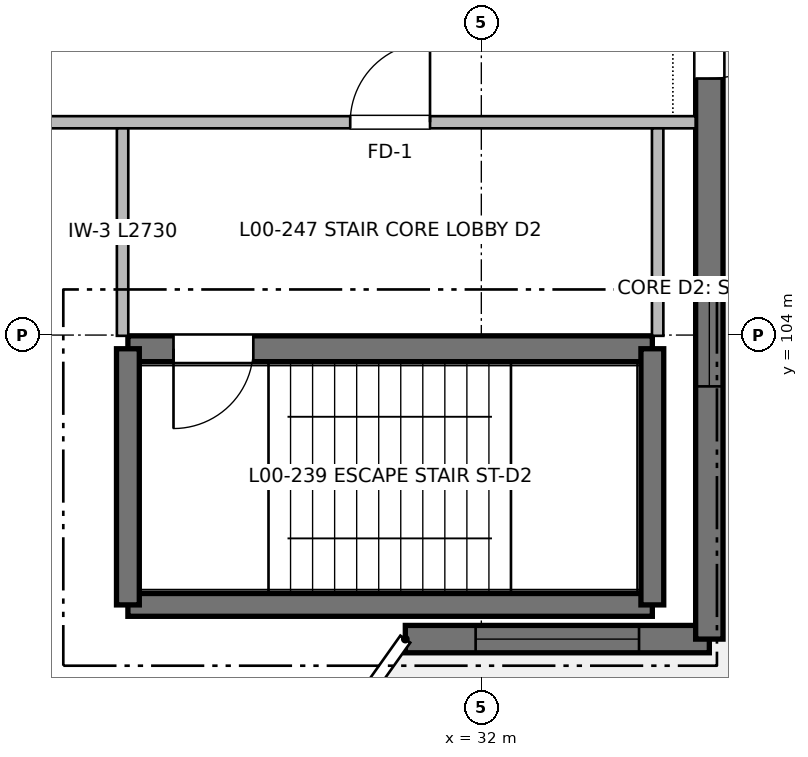
"""IFC4 building model, lengths in metres.
Left out: names, types, materials, properties, quantities, classifications, styles, units other than length and angle.
Written with IfcOpenShell. Run it as: python <this file> out.ifc"""

import sys

from ifc_helpers import new_model, si_unit, direction, frame, frame_2d, origin, place, context, subcontext, project, spatial, rectangle, extrude, element, fill, save


model = new_model("IFC4")
c1 = context("Model", 3, precision=1e-05, world=origin(), true_north=direction((0.0, 1.0)))
c2 = subcontext(c1, "Body", "Model", "MODEL_VIEW")
j1 = project(units=[si_unit("LENGTHUNIT", "METRE"), si_unit("PLANEANGLEUNIT", "RADIAN")], contexts=[c1])
p1 = place(None, origin())
s1 = spatial("IfcSite", under=j1, at=p1, CompositionType="ELEMENT")
p2 = place(p1, origin())
s2 = spatial("IfcBuilding", under=s1, at=p2, CompositionType="ELEMENT")
p3 = place(p2, origin())
s3 = spatial("IfcBuildingStorey", under=s2, at=p3, CompositionType="ELEMENT", Elevation=0.0)
p4 = place(p3, frame((27.35, 100.45, 0.0), z_axis=(0.0, 0.0, 1.0), x_axis=(1.0, 0.0, 0.0)))
e1 = element("IfcWall", 1, at=p4, inside=s3, PredefinedType="SHEAR", context=c2, shape_type="SweptSolid", body=[
    extrude(rectangle(XDim=6.9, YDim=0.3, at=frame_2d((3.45, 0.0))), origin(), (0.0, 0.0, 1.0), 4.16),
])
p5 = place(p3, frame((34.25, 103.82, 0.0), z_axis=(0.0, 0.0, 1.0), x_axis=(-1.0, 0.0, 0.0)))
e2 = element("IfcWall", 2, at=p5, inside=s3, PredefinedType="SHEAR", context=c2, shape_type="SweptSolid", body=[
    extrude(rectangle(XDim=6.9, YDim=0.34, at=frame_2d((3.45, 0.0))), origin(), (0.0, 0.0, 1.0), 4.16),
])
p6 = place(p5, frame((5.25, 0.0, 0.0)))
e3 = element("IfcOpeningElement", 3, at=p6, cuts=e2, PredefinedType="OPENING", context=c2, shape_type="SweptSolid", body=[
    extrude(rectangle(XDim=1.05, YDim=2.15, at=frame_2d((0.525, 1.075))), frame((0.0, 0.18, 0.0), z_axis=(0.0, -1.0, 0.0), x_axis=(1.0, 0.0, 0.0)), (0.0, 0.0, 1.0), 0.36),
])
for number, where, z_axis, x_axis in (
    (4, (27.35, 103.82, 0.0), (0.0, 0.0, 1.0), (0.0, -1.0, 0.0)),
    (5, (34.25, 100.45, 0.0), (0.0, 0.0, 1.0), (0.0, 1.0, 0.0)),
):
    element("IfcWall", number, at=place(p3, frame(where, z_axis=z_axis, x_axis=x_axis)), inside=s3, PredefinedType="SHEAR", context=c2, shape_type="SweptSolid", body=[
        extrude(rectangle(XDim=3.37, YDim=0.3, at=frame_2d((1.685, 0.0))), origin(), (0.0, 0.0, 1.0), 4.16),
    ])
p7 = place(p3, frame((35.0, 100.0, 0.0), z_axis=(0.0, 0.0, 1.0), x_axis=(-1.0, 0.0, 0.0)))
e6 = element("IfcWall", 6, at=p7, inside=s3, PredefinedType="SHEAR", context=c2, shape_type="SweptSolid", body=[
    extrude(rectangle(XDim=4.0, YDim=0.36, at=frame_2d((2.0, 0.0))), origin(), (0.0, 0.0, 1.0), 3.94),
])
p8 = place(p7, frame((0.925, 0.0, 0.95)))
e7 = element("IfcOpeningElement", 7, at=p8, cuts=e6, PredefinedType="OPENING", context=c2, shape_type="SweptSolid", body=[
    extrude(rectangle(XDim=2.15, YDim=1.8, at=frame_2d((1.075, 0.9))), frame((0.0, 0.19, 0.0), z_axis=(0.0, -1.0, 0.0), x_axis=(1.0, 0.0, 0.0)), (0.0, 0.0, 1.0), 0.38),
])
p9 = place(p3, frame((35.0, 116.0, 0.0), z_axis=(0.0, 0.0, 1.0), x_axis=(0.0, -1.0, 0.0)))
e8 = element("IfcWall", 8, at=p9, inside=s3, PredefinedType="SHEAR", context=c2, shape_type="SweptSolid", body=[
    extrude(rectangle(XDim=16.0, YDim=0.36, at=frame_2d((8.0, 0.0))), origin(), (0.0, 0.0, 1.0), 3.94),
])
p10 = place(p9, frame((7.375, 0.0, 0.0)))
e9 = element("IfcOpeningElement", 9, at=p10, cuts=e8, PredefinedType="OPENING", context=c2, shape_type="SweptSolid", body=[
    extrude(rectangle(XDim=1.25, YDim=2.2, at=frame_2d((0.625, 1.1))), frame((0.0, 0.19, 0.0), z_axis=(0.0, -1.0, 0.0), x_axis=(1.0, 0.0, 0.0)), (0.0, 0.0, 1.0), 0.38),
])
p11 = place(p9, frame((11.325, 0.0, 0.95)))
e10 = element("IfcOpeningElement", 10, at=p11, cuts=e8, PredefinedType="OPENING", context=c2, shape_type="SweptSolid", body=[
    extrude(rectangle(XDim=1.35, YDim=1.3, at=frame_2d((0.675, 0.65))), frame((0.0, 0.19, 0.0), z_axis=(0.0, -1.0, 0.0), x_axis=(1.0, 0.0, 0.0)), (0.0, 0.0, 1.0), 0.38),
])
p12 = place(p3, frame((17.2, 106.8, 0.0), z_axis=(0.0, 0.0, 1.0), x_axis=(1.0, 0.0, 0.0)))
e11 = element("IfcWall", 11, at=p12, inside=s3, PredefinedType="PARTITIONING", context=c2, shape_type="SweptSolid", body=[
    extrude(rectangle(XDim=17.62, YDim=0.16, at=frame_2d((8.81, 0.0))), origin(), (0.0, 0.0, 1.0), 3.895),
])
p13 = place(p12, frame((13.075, 0.0, 0.0)))
e12 = element("IfcOpeningElement", 12, at=p13, cuts=e11, PredefinedType="OPENING", context=c2, shape_type="SweptSolid", body=[
    extrude(rectangle(XDim=1.05, YDim=2.15, at=frame_2d((0.525, 1.075))), frame((0.0, 0.09, 0.0), z_axis=(0.0, -1.0, 0.0), x_axis=(1.0, 0.0, 0.0)), (0.0, 0.0, 1.0), 0.18),
])
for number, where, z_axis, x_axis in (
    (13, (27.28, 103.99, 0.0), (0.0, 0.0, 1.0), (0.0, 1.0, 0.0)),
    (14, (34.32, 103.99, 0.0), (0.0, 0.0, 1.0), (0.0, 1.0, 0.0)),
):
    element("IfcWall", number, at=place(p3, frame(where, z_axis=z_axis, x_axis=x_axis)), inside=s3, PredefinedType="PARTITIONING", context=c2, shape_type="SweptSolid", body=[
        extrude(rectangle(XDim=2.73, YDim=0.15, at=frame_2d((1.365, 0.0))), origin(), (0.0, 0.0, 1.0), 3.895),
    ])
p14 = place(p6, origin())
e15 = element("IfcDoor", 15, at=p14, inside=s3, OperationType="SINGLE_SWING_RIGHT", PredefinedType="DOOR", context=c2, shape_type="SweptSolid", body=[
    extrude(rectangle(XDim=1.05, YDim=2.15, at=frame_2d((0.525, 1.075))), frame((0.0, 0.025, 0.0), z_axis=(0.0, -1.0, 0.0), x_axis=(1.0, 0.0, 0.0)), (0.0, 0.0, 1.0), 0.05),
])
fill(e3, e15)
p15 = place(p8, origin())
e16 = element("IfcWindow", 16, at=p15, inside=s3, PartitioningType="SINGLE_PANEL", PredefinedType="WINDOW", context=c2, shape_type="SweptSolid", body=[
    extrude(rectangle(XDim=2.15, YDim=1.8, at=frame_2d((1.075, 0.9))), frame((0.0, 0.03, 0.0), z_axis=(0.0, -1.0, 0.0), x_axis=(1.0, 0.0, 0.0)), (0.0, 0.0, 1.0), 0.06),
])
fill(e7, e16)
p16 = place(p10, origin())
e17 = element("IfcDoor", 17, at=p16, inside=s3, OperationType="SINGLE_SWING_LEFT", PredefinedType="DOOR", context=c2, shape_type="SweptSolid", body=[
    extrude(rectangle(XDim=1.25, YDim=2.2, at=frame_2d((0.625, 1.1))), frame((0.0, 0.025, 0.0), z_axis=(0.0, -1.0, 0.0), x_axis=(1.0, 0.0, 0.0)), (0.0, 0.0, 1.0), 0.05),
])
fill(e9, e17)
p17 = place(p11, origin())
e18 = element("IfcWindow", 18, at=p17, inside=s3, PartitioningType="SINGLE_PANEL", PredefinedType="WINDOW", context=c2, shape_type="SweptSolid", body=[
    extrude(rectangle(XDim=1.35, YDim=1.3, at=frame_2d((0.675, 0.65))), frame((0.0, 0.03, 0.0), z_axis=(0.0, -1.0, 0.0), x_axis=(1.0, 0.0, 0.0)), (0.0, 0.0, 1.0), 0.06),
])
fill(e10, e18)
p18 = place(p13, origin())
e19 = element("IfcDoor", 19, at=p18, inside=s3, OperationType="SINGLE_SWING_RIGHT", PredefinedType="DOOR", context=c2, shape_type="SweptSolid", body=[
    extrude(rectangle(XDim=1.05, YDim=2.15, at=frame_2d((0.525, 1.075))), frame((0.0, 0.025, 0.0), z_axis=(0.0, -1.0, 0.0), x_axis=(1.0, 0.0, 0.0)), (0.0, 0.0, 1.0), 0.05),
])
fill(e12, e19)
save(model, sys.argv[1])
